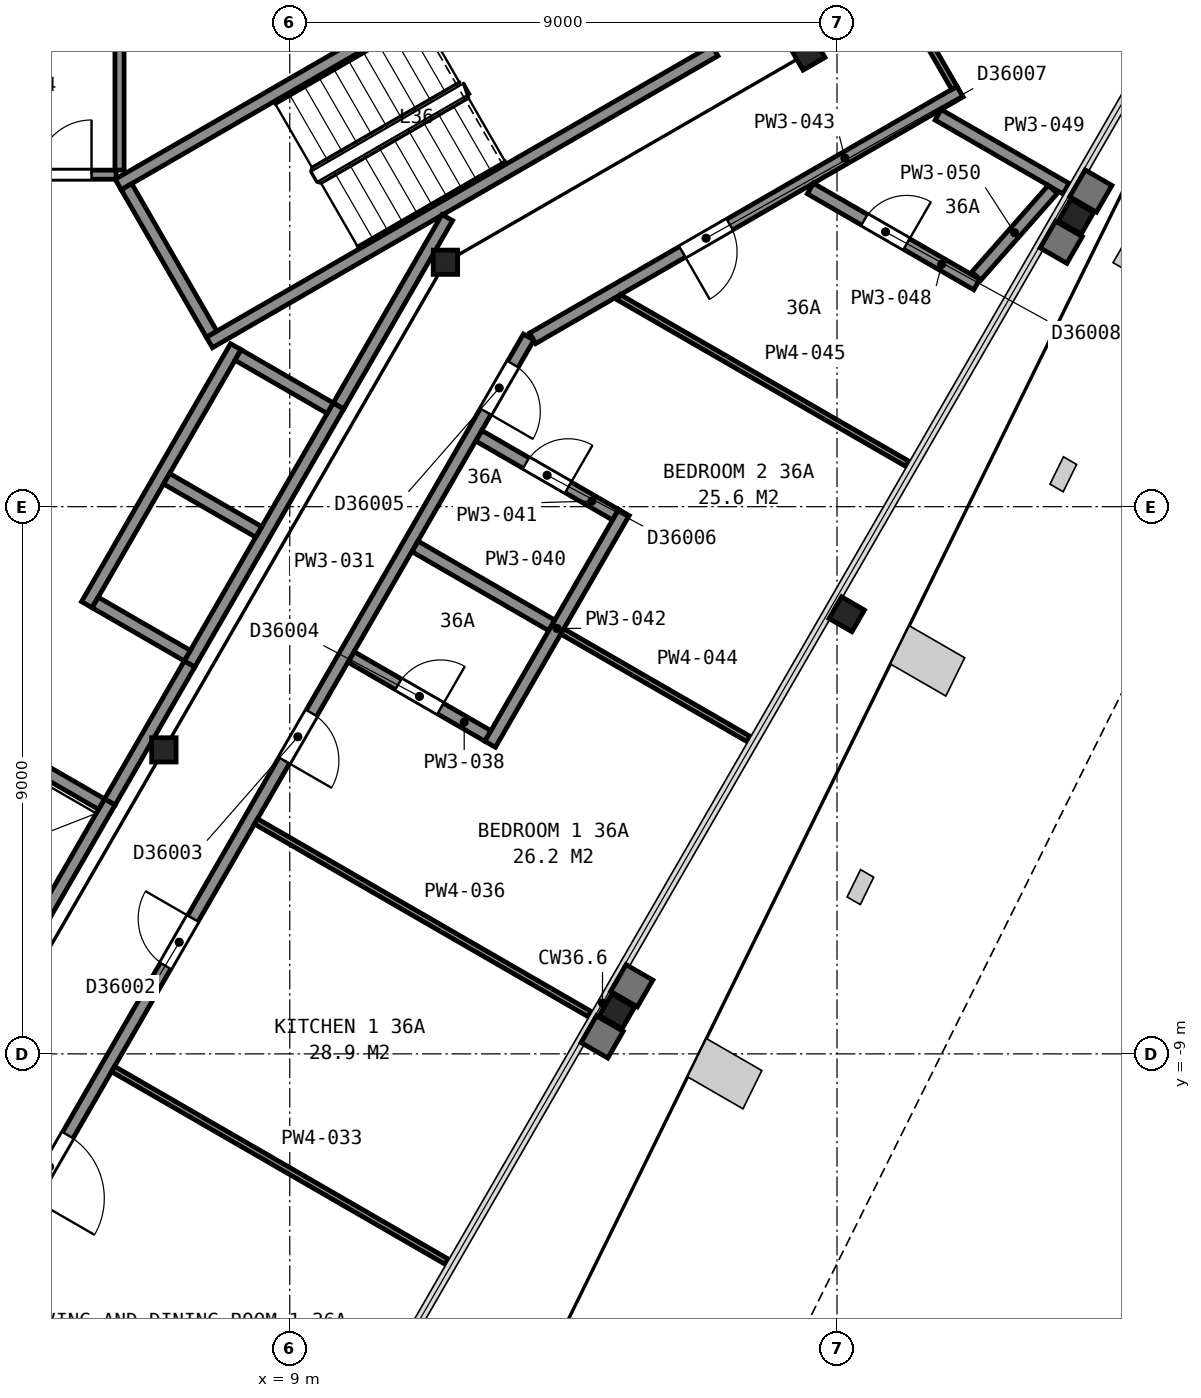
"""IFC4 building model, lengths in metres.
Left out: names, types, materials, properties, quantities, classifications, styles, units other than length and angle.
Written with IfcOpenShell. Run it as: python <this file> out.ifc"""

import sys

from ifc_helpers import new_model, si_unit, direction, frame, frame_2d, origin, origin_2d, place, context, subcontext, project, spatial, rectangle, i_section, extrude, element, fill, save


model = new_model("IFC4")
c1 = context("Model", 3, precision=1e-05, world=origin(), true_north=direction((0.0, 1.0)))
c2 = subcontext(c1, "Body", "Model", "MODEL_VIEW")
j1 = project(units=[si_unit("LENGTHUNIT", "METRE"), si_unit("PLANEANGLEUNIT", "RADIAN")], contexts=[c1])
p1 = place(None, origin())
s1 = spatial("IfcSite", under=j1, at=p1, CompositionType="ELEMENT")
p2 = place(p1, origin())
s2 = spatial("IfcBuilding", under=s1, at=p2, CompositionType="ELEMENT")
p3 = place(p2, frame((0.0, 0.0, 148.8)))
s3 = spatial("IfcBuildingStorey", under=s2, at=p3, CompositionType="ELEMENT", Elevation=148.8)
for number, where, z_axis, x_axis in (
    (1, (14.38, -8.3, 0.0), (0.0, 0.0, 1.0), (-0.5, -0.866, 0.0)),
    (2, (18.16, -1.77, 0.0), (0.0, 0.0, 1.0), (-0.5, -0.866, 0.0)),
    (3, (21.93, 4.77, 0.0), (0.0, 0.0, 1.0), (-0.5, -0.866, 0.0)),
):
    element("IfcColumn", number, at=place(p3, frame(where, z_axis=z_axis, x_axis=x_axis)), inside=s3, PredefinedType="COLUMN", context=c2, shape_type="SweptSolid", body=[
        extrude(i_section(OverallWidth=0.411, OverallDepth=0.434, WebThickness=0.036, FlangeThickness=0.057, FilletRadius=0.015, at=origin_2d()), origin(), (0.0, 0.0, 1.0), 3.7),
    ])
p4 = place(p3, frame((11.56, 4.02, 0.065), z_axis=(0.0, 0.0, 1.0), x_axis=(1.0, 0.0, 0.0)))
e4 = element("IfcColumn", 4, at=p4, inside=s3, PredefinedType="COLUMN", context=c2, shape_type="SweptSolid", body=[
    extrude(i_section(OverallWidth=0.401, OverallDepth=0.399, WebThickness=0.025, FlangeThickness=0.04, FilletRadius=0.015, at=origin_2d()), origin(), (0.0, 0.0, 1.0), 3.635),
])
p5 = place(p3, frame((17.52, 7.46, 0.055), z_axis=(0.0, 0.0, 1.0), x_axis=(0.5, -0.866025403784, 0.0)))
e5 = element("IfcColumn", 5, at=p5, inside=s3, PredefinedType="COLUMN", context=c2, shape_type="SweptSolid", body=[
    extrude(i_section(OverallWidth=0.406, OverallDepth=0.417, WebThickness=0.03, FlangeThickness=0.048, FilletRadius=0.015, at=origin_2d()), origin(), (0.0, 0.0, 1.0), 3.645),
])
p6 = place(p3, frame((6.93, -4.0, 0.04), z_axis=(0.0, 0.0, 1.0), x_axis=(1.0, 0.0, 0.0)))
e6 = element("IfcColumn", 6, at=p6, inside=s3, PredefinedType="COLUMN", context=c2, shape_type="SweptSolid", body=[
    extrude(i_section(OverallWidth=0.401, OverallDepth=0.399, WebThickness=0.025, FlangeThickness=0.04, FilletRadius=0.015, at=origin_2d()), origin(), (0.0, 0.0, 1.0), 3.66),
])
for number, where, z_axis, x_axis in (
    (7, (6.178, 5.299, 0.0), (0.0, 0.0, 1.0), (0.866, 0.5, 0.0)),
    (8, (7.678, 2.701, 0.0), (0.0, 0.0, 1.0), (0.866, 0.5, 0.0)),
):
    element("IfcWall", number, at=place(p3, frame(where, z_axis=z_axis, x_axis=x_axis)), inside=s3, PredefinedType="PARTITIONING", context=c2, shape_type="SweptSolid", body=[
        extrude(rectangle(XDim=9.6, YDim=0.2, at=frame_2d((4.8, 0.0))), origin(), (0.0, 0.0, 1.0), 3.45),
    ])
p7 = place(p3, frame((7.715, 2.838, 0.0), z_axis=(0.0, 0.0, 1.0), x_axis=(-0.500049511043, 0.865996816683, 0.0)))
e9 = element("IfcWall", 9, at=p7, inside=s3, PredefinedType="PARTITIONING", context=c2, shape_type="SweptSolid", body=[
    extrude(rectangle(XDim=2.8, YDim=0.2, at=frame_2d((1.4, 0.0))), origin(), (0.0, 0.0, 1.0), 3.45),
])
p8 = place(p3, frame((4.766, -7.065, 0.0), z_axis=(0.0, 0.0, 1.0), x_axis=(0.499948979701, 0.866054858364, 0.0)))
e10 = element("IfcWall", 10, at=p8, inside=s3, PredefinedType="PARTITIONING", context=c2, shape_type="SweptSolid", body=[
    extrude(rectangle(XDim=2.55, YDim=0.2, at=frame_2d((1.275, 0.0))), origin(), (0.0, 0.0, 1.0), 3.7),
])
p9 = place(p3, frame((7.351, -2.587, 0.0), z_axis=(0.0, 0.0, 1.0), x_axis=(0.500002801628, 0.866023786258, 0.0)))
e11 = element("IfcWall", 11, at=p9, inside=s3, PredefinedType="PARTITIONING", context=c2, shape_type="SweptSolid", body=[
    extrude(rectangle(XDim=4.9, YDim=0.2, at=frame_2d((2.45, 0.0))), origin(), (0.0, 0.0, 1.0), 3.7),
])
p10 = place(p3, frame((5.663, -1.612, 0.0), z_axis=(0.0, 0.0, 1.0), x_axis=(0.49998122708, 0.866036242063, 0.0)))
e12 = element("IfcWall", 12, at=p10, inside=s3, PredefinedType="PARTITIONING", context=c2, shape_type="SweptSolid", body=[
    extrude(rectangle(XDim=4.9, YDim=0.2, at=frame_2d((2.45, 0.0))), origin(), (0.0, 0.0, 1.0), 3.7),
])
p11 = place(p3, frame((9.665, 1.62, 0.0), z_axis=(0.0, 0.0, 1.0), x_axis=(-0.866002029911, 0.500040482552, 0.0)))
e13 = element("IfcWall", 13, at=p11, inside=s3, PredefinedType="PARTITIONING", context=c2, shape_type="SweptSolid", body=[
    extrude(rectangle(XDim=1.75, YDim=0.2, at=frame_2d((0.875, 0.0))), origin(), (0.0, 0.0, 1.0), 3.7),
])
for number, where, z_axis, x_axis in (
    (14, (8.49, -0.416, 0.0), (0.0, 0.0, 1.0), (-0.866, 0.5, 0.0)),
    (15, (7.315, -2.451, 0.0), (0.0, 0.0, 1.0), (-0.866, 0.5, 0.0)),
):
    element("IfcWall", number, at=place(p3, frame(where, z_axis=z_axis, x_axis=x_axis)), inside=s3, PredefinedType="PARTITIONING", context=c2, shape_type="SweptSolid", body=[
        extrude(rectangle(XDim=1.75, YDim=0.2, at=frame_2d((0.875, 0.0))), origin(), (0.0, 0.0, 1.0), 3.7),
    ])
p12 = place(p3, frame((5.905, -4.893, 0.0), z_axis=(0.0, 0.0, 1.0), x_axis=(-0.866002029911, 0.500040482552, 0.0)))
e16 = element("IfcWall", 16, at=p12, inside=s3, PredefinedType="PARTITIONING", context=c2, shape_type="SweptSolid", body=[
    extrude(rectangle(XDim=1.75, YDim=0.2, at=frame_2d((0.875, 0.0))), origin(), (0.0, 0.0, 1.0), 3.7),
])
p13 = place(p3, frame((0.925, 5.46, 0.0), z_axis=(0.0, 0.0, 1.0), x_axis=(1.0, 0.0, 0.0)))
e17 = element("IfcWall", 17, at=p13, inside=s3, PredefinedType="PARTITIONING", context=c2, shape_type="SweptSolid", body=[
    extrude(rectangle(XDim=5.22, YDim=0.15, at=frame_2d((2.61, 0.0))), origin(), (0.0, 0.0, 1.0), 3.45),
])
p14 = place(p13, frame((3.915, 0.0, 0.0)))
e18 = element("IfcOpeningElement", 18, at=p14, cuts=e17, PredefinedType="OPENING", context=c2, shape_type="SweptSolid", body=[
    extrude(rectangle(XDim=0.9, YDim=2.1, at=frame_2d((0.45, 1.05))), frame((0.0, 0.085, 0.0), z_axis=(0.0, -1.0, 0.0), x_axis=(1.0, 0.0, 0.0)), (0.0, 0.0, 1.0), 0.17),
])
p15 = place(p3, frame((6.042, -4.855, 0.0), z_axis=(0.0, 0.0, 1.0), x_axis=(0.500252727967, 0.865879442048, 0.0)))
e19 = element("IfcWall", 19, at=p15, inside=s3, PredefinedType="PARTITIONING", context=c2, shape_type="SweptSolid", body=[
    extrude(rectangle(XDim=2.617, YDim=0.2, at=frame_2d((1.309, 0.0))), origin(), (0.0, 0.0, 1.0), 3.45),
])
p16 = place(p3, frame((6.2, 5.535, 0.0), z_axis=(0.0, 0.0, 1.0), x_axis=(0.0, 1.0, 0.0)))
e20 = element("IfcWall", 20, at=p16, inside=s3, PredefinedType="PARTITIONING", context=c2, shape_type="SweptSolid", body=[
    extrude(rectangle(XDim=2.025, YDim=0.15, at=frame_2d((1.013, 0.0))), origin(), (0.0, 0.0, 1.0), 3.45),
])
p17 = place(p3, frame((9.803, 1.658, 0.0), z_axis=(0.0, 0.0, 1.0), x_axis=(0.499943114462, 0.866058244174, 0.0)))
e21 = element("IfcWall", 21, at=p17, inside=s3, PredefinedType="PARTITIONING", context=c2, shape_type="SweptSolid", body=[
    extrude(rectangle(XDim=3.576, YDim=0.2, at=frame_2d((1.788, 0.0))), origin(), (0.0, 0.0, 1.0), 3.45),
])
p18 = place(p3, frame((12.928, 2.789, 0.0), z_axis=(0.0, 0.0, 1.0), x_axis=(-0.499997769292, -0.86602669168, 0.0)))
e22 = element("IfcWall", 22, at=p18, inside=s3, PredefinedType="PARTITIONING", context=c2, shape_type="SweptSolid", body=[
    extrude(rectangle(XDim=17.706, YDim=0.2, at=frame_2d((8.853, 0.0))), origin(), (0.0, 0.0, 1.0), 2.713),
])
p19 = place(p18, frame((15.156, 0.0, 0.0)))
e23 = element("IfcOpeningElement", 23, at=p19, cuts=e22, PredefinedType="OPENING", context=c2, shape_type="SweptSolid", body=[
    extrude(rectangle(XDim=1.2, YDim=2.1, at=frame_2d((0.6, 1.05))), frame((0.0, 0.11, 0.0), z_axis=(0.0, -1.0, 0.0), x_axis=(1.0, 0.0, 0.0)), (0.0, 0.0, 1.0), 0.22),
])
p20 = place(p18, frame((11.042, 0.0, 0.0)))
e24 = element("IfcOpeningElement", 24, at=p20, cuts=e22, PredefinedType="OPENING", context=c2, shape_type="SweptSolid", body=[
    extrude(rectangle(XDim=0.9, YDim=2.1, at=frame_2d((0.45, 1.05))), frame((0.0, 0.11, 0.0), z_axis=(0.0, -1.0, 0.0), x_axis=(1.0, 0.0, 0.0)), (0.0, 0.0, 1.0), 0.22),
])
p21 = place(p18, frame((7.14, 0.0, 0.0)))
e25 = element("IfcOpeningElement", 25, at=p21, cuts=e22, PredefinedType="OPENING", context=c2, shape_type="SweptSolid", body=[
    extrude(rectangle(XDim=0.9, YDim=2.1, at=frame_2d((0.45, 1.05))), frame((0.0, 0.11, 0.0), z_axis=(0.0, -1.0, 0.0), x_axis=(1.0, 0.0, 0.0)), (0.0, 0.0, 1.0), 0.22),
])
p22 = place(p18, frame((0.515, 0.0, 0.0)))
e26 = element("IfcOpeningElement", 26, at=p22, cuts=e22, PredefinedType="OPENING", context=c2, shape_type="SweptSolid", body=[
    extrude(rectangle(XDim=0.9, YDim=2.1, at=frame_2d((0.45, 1.05))), frame((0.0, 0.11, 0.0), z_axis=(0.0, -1.0, 0.0), x_axis=(1.0, 0.0, 0.0)), (0.0, 0.0, 1.0), 0.22),
])
for number, where, z_axis, x_axis in (
    (27, (6.094, -9.249, 0.0), (0.0, 0.0, 1.0), (0.866, -0.5, 0.0)),
    (28, (8.445, -5.177, 0.0), (0.0, 0.0, 1.0), (0.866, -0.5, 0.0)),
):
    element("IfcWall", number, at=place(p3, frame(where, z_axis=z_axis, x_axis=x_axis)), inside=s3, PredefinedType="PARTITIONING", context=c2, shape_type="SweptSolid", body=[
        extrude(rectangle(XDim=6.333, YDim=0.1, at=frame_2d((3.167, 0.0))), origin(), (0.0, 0.0, 1.0), 2.713),
    ])
p23 = place(p3, frame((10.011, -2.473, 0.0), z_axis=(0.0, 0.0, 1.0), x_axis=(0.866005410122, -0.500034628441, 0.0)))
e29 = element("IfcWall", 29, at=p23, inside=s3, PredefinedType="PARTITIONING", context=c2, shape_type="SweptSolid", body=[
    extrude(rectangle(XDim=2.595, YDim=0.2, at=frame_2d((1.297, 0.0))), origin(), (0.0, 0.0, 1.0), 2.713),
])
p24 = place(p23, frame((0.895, 0.0, 0.0)))
e30 = element("IfcOpeningElement", 30, at=p24, cuts=e29, PredefinedType="OPENING", context=c2, shape_type="SweptSolid", body=[
    extrude(rectangle(XDim=0.8, YDim=2.1, at=frame_2d((0.4, 1.05))), frame((0.0, 0.11, 0.0), z_axis=(0.0, -1.0, 0.0), x_axis=(1.0, 0.0, 0.0)), (0.0, 0.0, 1.0), 0.22),
])
p25 = place(p3, frame((11.061, -0.655, 0.0), z_axis=(0.0, 0.0, 1.0), x_axis=(0.866046148833, -0.4999640668, 0.0)))
e31 = element("IfcWall", 31, at=p25, inside=s3, PredefinedType="PARTITIONING", context=c2, shape_type="SweptSolid", body=[
    extrude(rectangle(XDim=2.595, YDim=0.2, at=frame_2d((1.297, 0.0))), origin(), (0.0, 0.0, 1.0), 2.713),
])
p26 = place(p3, frame((14.358, -0.133, 0.0), z_axis=(0.0, 0.0, 1.0), x_axis=(-0.866028930478, 0.499993891537, 0.0)))
e32 = element("IfcWall", 32, at=p26, inside=s3, PredefinedType="PARTITIONING", context=c2, shape_type="SweptSolid", body=[
    extrude(rectangle(XDim=2.595, YDim=0.2, at=frame_2d((1.298, 0.0))), origin(), (0.0, 0.0, 1.0), 2.713),
])
p27 = place(p26, frame((0.9, 0.0, 0.0)))
e33 = element("IfcOpeningElement", 33, at=p27, cuts=e32, PredefinedType="OPENING", context=c2, shape_type="SweptSolid", body=[
    extrude(rectangle(XDim=0.8, YDim=2.1, at=frame_2d((0.4, 1.05))), frame((0.0, 0.11, 0.0), z_axis=(0.0, -1.0, 0.0), x_axis=(1.0, 0.0, 0.0)), (0.0, 0.0, 1.0), 0.22),
])
p28 = place(p3, frame((12.295, -3.908, 0.0), z_axis=(0.0, 0.0, 1.0), x_axis=(0.499916153699, 0.866073807057, 0.0)))
e34 = element("IfcWall", 34, at=p28, inside=s3, PredefinedType="PARTITIONING", context=c2, shape_type="SweptSolid", body=[
    extrude(rectangle(XDim=4.401, YDim=0.2, at=frame_2d((2.2, 0.0))), origin(), (0.0, 0.0, 1.0), 2.713),
])
p29 = place(p3, frame((20.023, 6.826, 0.0), z_axis=(0.0, 0.0, 1.0), x_axis=(-0.866100425926, -0.499870035319, 0.0)))
e35 = element("IfcWall", 35, at=p29, inside=s3, PredefinedType="PARTITIONING", context=c2, shape_type="SweptSolid", body=[
    extrude(rectangle(XDim=8.115, YDim=0.2, at=frame_2d((4.058, 0.0))), origin(), (0.0, 0.0, 1.0), 2.713),
])
p30 = place(p29, frame((4.373, 0.0, 0.0)))
e36 = element("IfcOpeningElement", 36, at=p30, cuts=e35, PredefinedType="OPENING", context=c2, shape_type="SweptSolid", body=[
    extrude(rectangle(XDim=0.9, YDim=2.1, at=frame_2d((0.45, 1.05))), frame((0.0, 0.11, 0.0), z_axis=(0.0, -1.0, 0.0), x_axis=(1.0, 0.0, 0.0)), (0.0, 0.0, 1.0), 0.22),
])
p31 = place(p3, frame((13.482, -2.052, 0.0), z_axis=(0.0, 0.0, 1.0), x_axis=(0.865998048674, -0.500047377448, 0.0)))
e37 = element("IfcWall", 37, at=p31, inside=s3, PredefinedType="PARTITIONING", context=c2, shape_type="SweptSolid", body=[
    extrude(rectangle(XDim=3.534, YDim=0.1, at=frame_2d((1.767, 0.0))), origin(), (0.0, 0.0, 1.0), 2.713),
])
p32 = place(p3, frame((14.412, 3.444, 0.0), z_axis=(0.0, 0.0, 1.0), x_axis=(0.866045268016, -0.499965592563, 0.0)))
e38 = element("IfcWall", 38, at=p32, inside=s3, PredefinedType="PARTITIONING", context=c2, shape_type="SweptSolid", body=[
    extrude(rectangle(XDim=5.476, YDim=0.1, at=frame_2d((2.738, 0.0))), origin(), (0.0, 0.0, 1.0), 2.713),
])
p33 = place(p3, frame((15.928, 13.812, 0.0), z_axis=(0.0, 0.0, 1.0), x_axis=(0.500420003794, -0.865782778648, 0.0)))
e39 = element("IfcWall", 39, at=p33, inside=s3, PredefinedType="PARTITIONING", context=c2, shape_type="SweptSolid", body=[
    extrude(rectangle(XDim=7.997, YDim=0.1, at=frame_2d((3.999, 0.0))), origin(), (0.0, 0.0, 1.0), 2.713),
])
p34 = place(p33, frame((3.4, 0.0, 0.0)))
e40 = element("IfcOpeningElement", 40, at=p34, cuts=e39, PredefinedType="OPENING", context=c2, shape_type="SweptSolid", body=[
    extrude(rectangle(XDim=1.2, YDim=2.1, at=frame_2d((0.6, 1.05))), frame((0.0, 0.06, 0.0), z_axis=(0.0, -1.0, 0.0), x_axis=(1.0, 0.0, 0.0)), (0.0, 0.0, 1.0), 0.12),
])
p35 = place(p3, frame((17.562, 5.232, 0.0), z_axis=(0.0, 0.0, 1.0), x_axis=(0.866109679077, -0.499854002494, 0.0)))
e41 = element("IfcWall", 41, at=p35, inside=s3, PredefinedType="PARTITIONING", context=c2, shape_type="SweptSolid", body=[
    extrude(rectangle(XDim=3.16, YDim=0.2, at=frame_2d((1.58, 0.0))), origin(), (0.0, 0.0, 1.0), 2.713),
])
p36 = place(p35, frame((1.027, 0.0, 0.0)))
e42 = element("IfcOpeningElement", 42, at=p36, cuts=e41, PredefinedType="OPENING", context=c2, shape_type="SweptSolid", body=[
    extrude(rectangle(XDim=0.8, YDim=2.1, at=frame_2d((0.4, 1.05))), frame((0.0, 0.11, 0.0), z_axis=(0.0, -1.0, 0.0), x_axis=(1.0, 0.0, 0.0)), (0.0, 0.0, 1.0), 0.22),
])
p37 = place(p3, frame((19.663, 6.445, 0.0), z_axis=(0.0, 0.0, 1.0), x_axis=(0.86589602499, -0.50022402372, 0.0)))
e43 = element("IfcWall", 43, at=p37, inside=s3, PredefinedType="PARTITIONING", context=c2, shape_type="SweptSolid", body=[
    extrude(rectangle(XDim=2.43, YDim=0.2, at=frame_2d((1.215, 0.0))), origin(), (0.0, 0.0, 1.0), 2.713),
])
p38 = place(p3, frame((20.291, 3.793, 0.0), z_axis=(0.0, 0.0, 1.0), x_axis=(0.661392149771, 0.750040281733, 0.0)))
e44 = element("IfcWall", 44, at=p38, inside=s3, PredefinedType="PARTITIONING", context=c2, shape_type="SweptSolid", body=[
    extrude(rectangle(XDim=1.9, YDim=0.2, at=frame_2d((0.95, 0.0))), origin(), (0.0, 0.0, 1.0), 2.713),
])
p39 = place(p14, origin())
e45 = element("IfcDoor", 45, at=p39, inside=s3, OperationType="SINGLE_SWING_RIGHT", PredefinedType="DOOR", context=c2, shape_type="SweptSolid", body=[
    extrude(rectangle(XDim=0.9, YDim=2.1, at=frame_2d((0.45, 1.05))), frame((0.0, 0.025, 0.0), z_axis=(0.0, -1.0, 0.0), x_axis=(1.0, 0.0, 0.0)), (0.0, 0.0, 1.0), 0.05),
])
fill(e18, e45)
p40 = place(p19, origin())
e46 = element("IfcDoor", 46, at=p40, inside=s3, OperationType="SINGLE_SWING_RIGHT", PredefinedType="DOOR", context=c2, shape_type="SweptSolid", body=[
    extrude(rectangle(XDim=1.2, YDim=2.1, at=frame_2d((0.6, 1.05))), frame((0.0, 0.025, 0.0), z_axis=(0.0, -1.0, 0.0), x_axis=(1.0, 0.0, 0.0)), (0.0, 0.0, 1.0), 0.05),
])
fill(e23, e46)
p41 = place(p20, origin())
e47 = element("IfcDoor", 47, at=p41, inside=s3, OperationType="SINGLE_SWING_LEFT", PredefinedType="DOOR", context=c2, shape_type="SweptSolid", body=[
    extrude(rectangle(XDim=0.9, YDim=2.1, at=frame_2d((0.45, 1.05))), frame((0.0, 0.025, 0.0), z_axis=(0.0, -1.0, 0.0), x_axis=(1.0, 0.0, 0.0)), (0.0, 0.0, 1.0), 0.05),
])
fill(e24, e47)
p42 = place(p21, origin())
e48 = element("IfcDoor", 48, at=p42, inside=s3, OperationType="SINGLE_SWING_RIGHT", PredefinedType="DOOR", context=c2, shape_type="SweptSolid", body=[
    extrude(rectangle(XDim=0.9, YDim=2.1, at=frame_2d((0.45, 1.05))), frame((0.0, 0.025, 0.0), z_axis=(0.0, -1.0, 0.0), x_axis=(1.0, 0.0, 0.0)), (0.0, 0.0, 1.0), 0.05),
])
fill(e25, e48)
p43 = place(p22, origin())
e49 = element("IfcDoor", 49, at=p43, inside=s3, OperationType="SINGLE_SWING_RIGHT", PredefinedType="DOOR", context=c2, shape_type="SweptSolid", body=[
    extrude(rectangle(XDim=0.9, YDim=2.1, at=frame_2d((0.45, 1.05))), frame((0.0, 0.025, 0.0), z_axis=(0.0, -1.0, 0.0), x_axis=(1.0, 0.0, 0.0)), (0.0, 0.0, 1.0), 0.05),
])
fill(e26, e49)
p44 = place(p24, origin())
e50 = element("IfcDoor", 50, at=p44, inside=s3, OperationType="SINGLE_SWING_RIGHT", PredefinedType="DOOR", context=c2, shape_type="SweptSolid", body=[
    extrude(rectangle(XDim=0.8, YDim=2.1, at=frame_2d((0.4, 1.05))), frame((0.0, 0.025, 0.0), z_axis=(0.0, -1.0, 0.0), x_axis=(1.0, 0.0, 0.0)), (0.0, 0.0, 1.0), 0.05),
])
fill(e30, e50)
p45 = place(p27, origin())
e51 = element("IfcDoor", 51, at=p45, inside=s3, OperationType="SINGLE_SWING_LEFT", PredefinedType="DOOR", context=c2, shape_type="SweptSolid", body=[
    extrude(rectangle(XDim=0.8, YDim=2.1, at=frame_2d((0.4, 1.05))), frame((0.0, 0.025, 0.0), z_axis=(0.0, -1.0, 0.0), x_axis=(1.0, 0.0, 0.0)), (0.0, 0.0, 1.0), 0.05),
])
fill(e33, e51)
p46 = place(p30, origin())
e52 = element("IfcDoor", 52, at=p46, inside=s3, OperationType="SINGLE_SWING_RIGHT", PredefinedType="DOOR", context=c2, shape_type="SweptSolid", body=[
    extrude(rectangle(XDim=0.9, YDim=2.1, at=frame_2d((0.45, 1.05))), frame((0.0, 0.025, 0.0), z_axis=(0.0, -1.0, 0.0), x_axis=(1.0, 0.0, 0.0)), (0.0, 0.0, 1.0), 0.05),
])
fill(e36, e52)
p47 = place(p36, origin())
e53 = element("IfcDoor", 53, at=p47, inside=s3, OperationType="SINGLE_SWING_RIGHT", PredefinedType="DOOR", context=c2, shape_type="SweptSolid", body=[
    extrude(rectangle(XDim=0.8, YDim=2.1, at=frame_2d((0.4, 1.05))), frame((0.0, 0.025, 0.0), z_axis=(0.0, -1.0, 0.0), x_axis=(1.0, 0.0, 0.0)), (0.0, 0.0, 1.0), 0.05),
])
fill(e42, e53)
save(model, sys.argv[1])
